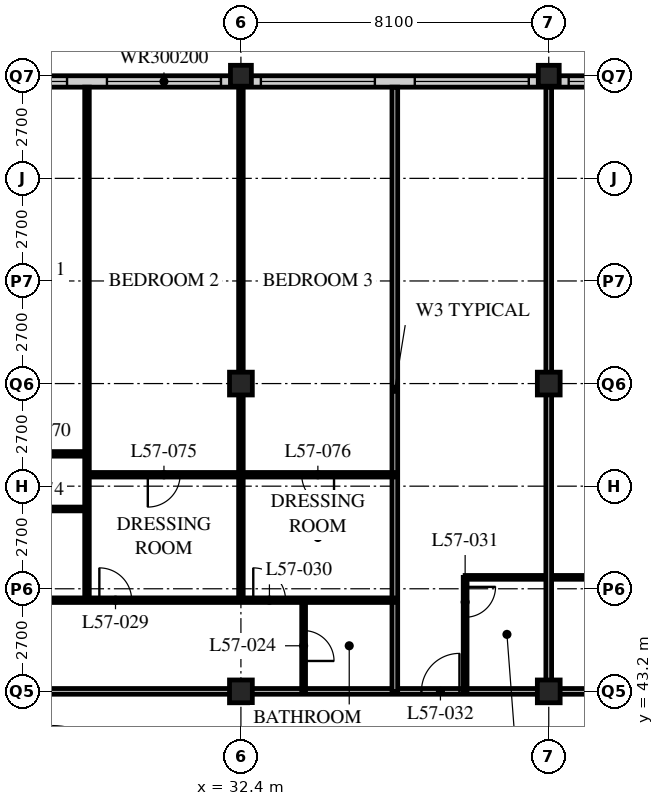
"""IFC4 building model, lengths in metres.
Left out: names, types, materials, properties, quantities, classifications, styles, units other than length and angle.
Written with IfcOpenShell. Run it as: python <this file> out.ifc"""

import sys

from ifc_helpers import new_model, si_unit, direction, frame, frame_2d, origin, origin_2d, place, context, subcontext, project, spatial, rectangle, hollow_rectangle, extrude, element, fill, save


model = new_model("IFC4")
c1 = context("Model", 3, precision=1e-05, world=origin(), true_north=direction((0.0, 1.0)))
c2 = subcontext(c1, "Body", "Model", "MODEL_VIEW")
j1 = project(units=[si_unit("LENGTHUNIT", "METRE"), si_unit("PLANEANGLEUNIT", "RADIAN")], contexts=[c1])
p1 = place(None, origin())
s1 = spatial("IfcSite", under=j1, at=p1, CompositionType="ELEMENT")
p2 = place(p1, origin())
s2 = spatial("IfcBuilding", under=s1, at=p2, CompositionType="ELEMENT")
p3 = place(p2, frame((0.0, 0.0, 220.8)))
s3 = spatial("IfcBuildingStorey", under=s2, at=p3, CompositionType="ELEMENT", Elevation=220.8)
for number, where, z_axis, x_axis in (
    (1, (32.4, 43.2, 0.0), (0.0, 0.0, 1.0), (1.0, 0.0, 0.0)),
    (2, (32.4, 51.3, 0.0), (0.0, 0.0, 1.0), (1.0, 0.0, 0.0)),
):
    element("IfcColumn", number, at=place(p3, frame(where, z_axis=z_axis, x_axis=x_axis)), inside=s3, PredefinedType="COLUMN", context=c2, shape_type="SweptSolid", body=[
        extrude(hollow_rectangle(XDim=0.6, YDim=0.6, WallThickness=0.05, at=origin_2d()), origin(), (0.0, 0.0, 1.0), 3.6),
    ])
p4 = place(p3, frame((32.4, 59.4, 0.0), z_axis=(0.0, 0.0, 1.0), x_axis=(1.0, 0.0, 0.0)))
e3 = element("IfcColumn", 3, at=p4, inside=s3, PredefinedType="COLUMN", context=c2, shape_type="SweptSolid", body=[
    extrude(hollow_rectangle(XDim=0.55, YDim=0.55, WallThickness=0.045, at=origin_2d()), origin(), (0.0, 0.0, 1.0), 3.6),
])
for number, where, z_axis, x_axis in (
    (4, (40.5, 43.2, 0.0), (0.0, 0.0, 1.0), (1.0, 0.0, 0.0)),
    (5, (40.5, 51.3, 0.0), (0.0, 0.0, 1.0), (1.0, 0.0, 0.0)),
):
    element("IfcColumn", number, at=place(p3, frame(where, z_axis=z_axis, x_axis=x_axis)), inside=s3, PredefinedType="COLUMN", context=c2, shape_type="SweptSolid", body=[
        extrude(hollow_rectangle(XDim=0.6, YDim=0.6, WallThickness=0.05, at=origin_2d()), origin(), (0.0, 0.0, 1.0), 3.6),
    ])
p5 = place(p3, frame((40.5, 59.4, 0.0), z_axis=(0.0, 0.0, 1.0), x_axis=(1.0, 0.0, 0.0)))
e6 = element("IfcColumn", 6, at=p5, inside=s3, PredefinedType="COLUMN", context=c2, shape_type="SweptSolid", body=[
    extrude(hollow_rectangle(XDim=0.55, YDim=0.55, WallThickness=0.045, at=origin_2d()), origin(), (0.0, 0.0, 1.0), 3.6),
])
p6 = place(p3, frame((48.3, 59.25, 0.0), z_axis=(0.0, 0.0, 1.0), x_axis=(-1.0, 0.0, 0.0)))
e7 = element("IfcWall", 7, at=p6, inside=s3, PredefinedType="SOLIDWALL", context=c2, shape_type="SweptSolid", body=[
    extrude(rectangle(XDim=40.2, YDim=0.3, at=frame_2d((20.1, 0.0))), origin(), (0.0, 0.0, 1.0), 3.39),
])
p7 = place(p6, frame((0.225, 0.0, 0.6)))
e8 = element("IfcOpeningElement", 8, at=p7, cuts=e7, PredefinedType="OPENING", context=c2, shape_type="SweptSolid", body=[
    extrude(rectangle(XDim=3.0, YDim=2.0, at=frame_2d((1.5, 1.0))), frame((0.0, 0.16, 0.0), z_axis=(0.0, -1.0, 0.0), x_axis=(1.0, 0.0, 0.0)), (0.0, 0.0, 1.0), 0.32),
])
p8 = place(p6, frame((4.275, 0.0, 0.6)))
e9 = element("IfcOpeningElement", 9, at=p8, cuts=e7, PredefinedType="OPENING", context=c2, shape_type="SweptSolid", body=[
    extrude(rectangle(XDim=3.0, YDim=2.0, at=frame_2d((1.5, 1.0))), frame((0.0, 0.16, 0.0), z_axis=(0.0, -1.0, 0.0), x_axis=(1.0, 0.0, 0.0)), (0.0, 0.0, 1.0), 0.32),
])
p9 = place(p6, frame((8.325, 0.0, 0.6)))
e10 = element("IfcOpeningElement", 10, at=p9, cuts=e7, PredefinedType="OPENING", context=c2, shape_type="SweptSolid", body=[
    extrude(rectangle(XDim=3.0, YDim=2.0, at=frame_2d((1.5, 1.0))), frame((0.0, 0.16, 0.0), z_axis=(0.0, -1.0, 0.0), x_axis=(1.0, 0.0, 0.0)), (0.0, 0.0, 1.0), 0.32),
])
p10 = place(p6, frame((12.375, 0.0, 0.6)))
e11 = element("IfcOpeningElement", 11, at=p10, cuts=e7, PredefinedType="OPENING", context=c2, shape_type="SweptSolid", body=[
    extrude(rectangle(XDim=3.0, YDim=2.0, at=frame_2d((1.5, 1.0))), frame((0.0, 0.16, 0.0), z_axis=(0.0, -1.0, 0.0), x_axis=(1.0, 0.0, 0.0)), (0.0, 0.0, 1.0), 0.32),
])
p11 = place(p6, frame((16.425, 0.0, 0.6)))
e12 = element("IfcOpeningElement", 12, at=p11, cuts=e7, PredefinedType="OPENING", context=c2, shape_type="SweptSolid", body=[
    extrude(rectangle(XDim=3.0, YDim=2.0, at=frame_2d((1.5, 1.0))), frame((0.0, 0.16, 0.0), z_axis=(0.0, -1.0, 0.0), x_axis=(1.0, 0.0, 0.0)), (0.0, 0.0, 1.0), 0.32),
])
p12 = place(p6, frame((20.475, 0.0, 0.6)))
e13 = element("IfcOpeningElement", 13, at=p12, cuts=e7, PredefinedType="OPENING", context=c2, shape_type="SweptSolid", body=[
    extrude(rectangle(XDim=3.0, YDim=2.0, at=frame_2d((1.5, 1.0))), frame((0.0, 0.16, 0.0), z_axis=(0.0, -1.0, 0.0), x_axis=(1.0, 0.0, 0.0)), (0.0, 0.0, 1.0), 0.32),
])
p13 = place(p6, frame((24.525, 0.0, 0.6)))
e14 = element("IfcOpeningElement", 14, at=p13, cuts=e7, PredefinedType="OPENING", context=c2, shape_type="SweptSolid", body=[
    extrude(rectangle(XDim=3.0, YDim=2.0, at=frame_2d((1.5, 1.0))), frame((0.0, 0.16, 0.0), z_axis=(0.0, -1.0, 0.0), x_axis=(1.0, 0.0, 0.0)), (0.0, 0.0, 1.0), 0.32),
])
p14 = place(p6, frame((28.575, 0.0, 0.6)))
e15 = element("IfcOpeningElement", 15, at=p14, cuts=e7, PredefinedType="OPENING", context=c2, shape_type="SweptSolid", body=[
    extrude(rectangle(XDim=3.0, YDim=2.0, at=frame_2d((1.5, 1.0))), frame((0.0, 0.16, 0.0), z_axis=(0.0, -1.0, 0.0), x_axis=(1.0, 0.0, 0.0)), (0.0, 0.0, 1.0), 0.32),
])
p15 = place(p6, frame((32.625, 0.0, 0.6)))
e16 = element("IfcOpeningElement", 16, at=p15, cuts=e7, PredefinedType="OPENING", context=c2, shape_type="SweptSolid", body=[
    extrude(rectangle(XDim=3.0, YDim=2.0, at=frame_2d((1.5, 1.0))), frame((0.0, 0.16, 0.0), z_axis=(0.0, -1.0, 0.0), x_axis=(1.0, 0.0, 0.0)), (0.0, 0.0, 1.0), 0.32),
])
p16 = place(p6, frame((36.675, 0.0, 0.6)))
e17 = element("IfcOpeningElement", 17, at=p16, cuts=e7, PredefinedType="OPENING", context=c2, shape_type="SweptSolid", body=[
    extrude(rectangle(XDim=3.0, YDim=2.0, at=frame_2d((1.5, 1.0))), frame((0.0, 0.16, 0.0), z_axis=(0.0, -1.0, 0.0), x_axis=(1.0, 0.0, 0.0)), (0.0, 0.0, 1.0), 0.32),
])
p17 = place(p3, frame((12.15, 43.2, 0.0), z_axis=(0.0, 0.0, 1.0), x_axis=(1.0, 0.0, 0.0)))
e18 = element("IfcWall", 18, at=p17, inside=s3, PredefinedType="PARTITIONING", context=c2, shape_type="SweptSolid", body=[
    extrude(rectangle(XDim=36.45, YDim=0.15, at=frame_2d((18.225, 0.0))), origin(), (0.0, 0.0, 1.0), 2.628),
])
p18 = place(p17, frame((4.95, 0.0, 0.0)))
e19 = element("IfcOpeningElement", 19, at=p18, cuts=e18, PredefinedType="OPENING", context=c2, shape_type="SweptSolid", body=[
    extrude(rectangle(XDim=1.0, YDim=2.1, at=frame_2d((0.5, 1.05))), frame((0.0, 0.085, 0.0), z_axis=(0.0, -1.0, 0.0), x_axis=(1.0, 0.0, 0.0)), (0.0, 0.0, 1.0), 0.17),
])
p19 = place(p17, frame((25.0, 0.0, 0.0)))
e20 = element("IfcOpeningElement", 20, at=p19, cuts=e18, PredefinedType="OPENING", context=c2, shape_type="SweptSolid", body=[
    extrude(rectangle(XDim=1.0, YDim=2.1, at=frame_2d((0.5, 1.05))), frame((0.0, 0.085, 0.0), z_axis=(0.0, -1.0, 0.0), x_axis=(1.0, 0.0, 0.0)), (0.0, 0.0, 1.0), 0.17),
])
p20 = place(p17, frame((30.7, 0.0, 0.0)))
e21 = element("IfcOpeningElement", 21, at=p20, cuts=e18, PredefinedType="OPENING", context=c2, shape_type="SweptSolid", body=[
    extrude(rectangle(XDim=1.0, YDim=2.1, at=frame_2d((0.5, 1.05))), frame((0.0, 0.085, 0.0), z_axis=(0.0, -1.0, 0.0), x_axis=(1.0, 0.0, 0.0)), (0.0, 0.0, 1.0), 0.17),
])
p21 = place(p17, frame((33.925, 0.0, 0.0)))
e22 = element("IfcOpeningElement", 22, at=p21, cuts=e18, PredefinedType="OPENING", context=c2, shape_type="SweptSolid", body=[
    extrude(rectangle(XDim=1.0, YDim=2.1, at=frame_2d((0.5, 1.05))), frame((0.0, 0.085, 0.0), z_axis=(0.0, -1.0, 0.0), x_axis=(1.0, 0.0, 0.0)), (0.0, 0.0, 1.0), 0.17),
])
p22 = place(p17, frame((1.525, 0.0, 0.0)))
e23 = element("IfcOpeningElement", 23, at=p22, cuts=e18, PredefinedType="OPENING", context=c2, shape_type="SweptSolid", body=[
    extrude(rectangle(XDim=1.0, YDim=2.1, at=frame_2d((0.5, 1.05))), frame((0.0, 0.085, 0.0), z_axis=(0.0, -1.0, 0.0), x_axis=(1.0, 0.0, 0.0)), (0.0, 0.0, 1.0), 0.17),
])
p23 = place(p3, frame((34.05, 43.2, 0.0), z_axis=(0.0, 0.0, 1.0), x_axis=(0.0, 1.0, 0.0)))
e24 = element("IfcWall", 24, at=p23, inside=s3, PredefinedType="PARTITIONING", context=c2, shape_type="SweptSolid", body=[
    extrude(rectangle(XDim=2.4, YDim=0.1, at=frame_2d((1.2, 0.0))), origin(), (0.0, 0.0, 1.0), 3.39),
])
p24 = place(p23, frame((0.8, 0.0, 0.0)))
e25 = element("IfcOpeningElement", 25, at=p24, cuts=e24, PredefinedType="OPENING", context=c2, shape_type="SweptSolid", body=[
    extrude(rectangle(XDim=0.8, YDim=2.1, at=frame_2d((0.4, 1.05))), frame((0.0, 0.06, 0.0), z_axis=(0.0, -1.0, 0.0), x_axis=(1.0, 0.0, 0.0)), (0.0, 0.0, 1.0), 0.12),
])
p25 = place(p3, frame((26.05, 48.0, 0.0), z_axis=(0.0, 0.0, 1.0), x_axis=(1.0, 0.0, 0.0)))
e26 = element("IfcWall", 26, at=p25, inside=s3, PredefinedType="PARTITIONING", context=c2, shape_type="SweptSolid", body=[
    extrude(rectangle(XDim=2.3, YDim=0.1, at=frame_2d((1.15, 0.0))), origin(), (0.0, 0.0, 1.0), 3.39),
])
p26 = place(p3, frame((28.35, 45.6, 0.0), z_axis=(0.0, 0.0, 1.0), x_axis=(0.0, 1.0, 0.0)))
e27 = element("IfcWall", 27, at=p26, inside=s3, PredefinedType="PARTITIONING", context=c2, shape_type="SweptSolid", body=[
    extrude(rectangle(XDim=13.5, YDim=0.12, at=frame_2d((6.75, 0.0))), origin(), (0.0, 0.0, 1.0), 3.39),
])
p27 = place(p3, frame((32.4, 45.6, 0.0), z_axis=(0.0, 0.0, 1.0), x_axis=(0.0, 1.0, 0.0)))
e28 = element("IfcWall", 28, at=p27, inside=s3, PredefinedType="PARTITIONING", context=c2, shape_type="SweptSolid", body=[
    extrude(rectangle(XDim=13.5, YDim=0.12, at=frame_2d((6.75, 0.0))), origin(), (0.0, 0.0, 1.0), 2.628),
])
p28 = place(p3, frame((36.45, 43.2, 0.0), z_axis=(0.0, 0.0, 1.0), x_axis=(0.0, 1.0, 0.0)))
e29 = element("IfcWall", 29, at=p28, inside=s3, PredefinedType="PARTITIONING", context=c2, shape_type="SweptSolid", body=[
    extrude(rectangle(XDim=15.9, YDim=0.15, at=frame_2d((7.95, 0.0))), origin(), (0.0, 0.0, 1.0), 3.39),
])
p29 = place(p3, frame((38.3, 46.2, 0.0), z_axis=(0.0, 0.0, 1.0), x_axis=(1.0, 0.0, 0.0)))
e30 = element("IfcWall", 30, at=p29, inside=s3, PredefinedType="PARTITIONING", context=c2, shape_type="SweptSolid", body=[
    extrude(rectangle(XDim=4.4, YDim=0.1, at=frame_2d((2.2, 0.0))), origin(), (0.0, 0.0, 1.0), 3.39),
])
p30 = place(p3, frame((38.3, 43.2, 0.0), z_axis=(0.0, 0.0, 1.0), x_axis=(0.0, 1.0, 0.0)))
e31 = element("IfcWall", 31, at=p30, inside=s3, PredefinedType="PARTITIONING", context=c2, shape_type="SweptSolid", body=[
    extrude(rectangle(XDim=3.0, YDim=0.1, at=frame_2d((1.5, 0.0))), origin(), (0.0, 0.0, 1.0), 3.39),
])
p31 = place(p30, frame((1.95, 0.0, 0.0)))
e32 = element("IfcOpeningElement", 32, at=p31, cuts=e31, PredefinedType="OPENING", context=c2, shape_type="SweptSolid", body=[
    extrude(rectangle(XDim=0.8, YDim=2.1, at=frame_2d((0.4, 1.05))), frame((0.0, 0.06, 0.0), z_axis=(0.0, -1.0, 0.0), x_axis=(1.0, 0.0, 0.0)), (0.0, 0.0, 1.0), 0.12),
])
p32 = place(p3, frame((40.5, 43.2, 0.0), z_axis=(0.0, 0.0, 1.0), x_axis=(0.0, 1.0, 0.0)))
e33 = element("IfcWall", 33, at=p32, inside=s3, PredefinedType="PARTITIONING", context=c2, shape_type="SweptSolid", body=[
    extrude(rectangle(XDim=15.9, YDim=0.15, at=frame_2d((7.95, 0.0))), origin(), (0.0, 0.0, 1.0), 2.628),
])
p33 = place(p3, frame((8.15, 45.6, 0.0), z_axis=(0.0, 0.0, 1.0), x_axis=(1.0, 0.0, 0.0)))
e34 = element("IfcWall", 34, at=p33, inside=s3, PredefinedType="PARTITIONING", context=c2, shape_type="SweptSolid", body=[
    extrude(rectangle(XDim=28.3, YDim=0.12, at=frame_2d((14.15, 0.0))), origin(), (0.0, 0.0, 1.0), 3.39),
])
p34 = place(p33, frame((9.025, 0.0, 0.0)))
e35 = element("IfcOpeningElement", 35, at=p34, cuts=e34, PredefinedType="OPENING", context=c2, shape_type="SweptSolid", body=[
    extrude(rectangle(XDim=0.85, YDim=2.1, at=frame_2d((0.425, 1.05))), frame((0.0, 0.07, 0.0), z_axis=(0.0, -1.0, 0.0), x_axis=(1.0, 0.0, 0.0)), (0.0, 0.0, 1.0), 0.14),
])
p35 = place(p33, frame((16.475, 0.0, 0.0)))
e36 = element("IfcOpeningElement", 36, at=p35, cuts=e34, PredefinedType="OPENING", context=c2, shape_type="SweptSolid", body=[
    extrude(rectangle(XDim=0.85, YDim=2.1, at=frame_2d((0.425, 1.05))), frame((0.0, 0.07, 0.0), z_axis=(0.0, -1.0, 0.0), x_axis=(1.0, 0.0, 0.0)), (0.0, 0.0, 1.0), 0.14),
])
p36 = place(p33, frame((20.525, 0.0, 0.0)))
e37 = element("IfcOpeningElement", 37, at=p36, cuts=e34, PredefinedType="OPENING", context=c2, shape_type="SweptSolid", body=[
    extrude(rectangle(XDim=0.85, YDim=2.1, at=frame_2d((0.425, 1.05))), frame((0.0, 0.07, 0.0), z_axis=(0.0, -1.0, 0.0), x_axis=(1.0, 0.0, 0.0)), (0.0, 0.0, 1.0), 0.14),
])
p37 = place(p33, frame((24.575, 0.0, 0.0)))
e38 = element("IfcOpeningElement", 38, at=p37, cuts=e34, PredefinedType="OPENING", context=c2, shape_type="SweptSolid", body=[
    extrude(rectangle(XDim=0.85, YDim=2.1, at=frame_2d((0.425, 1.05))), frame((0.0, 0.07, 0.0), z_axis=(0.0, -1.0, 0.0), x_axis=(1.0, 0.0, 0.0)), (0.0, 0.0, 1.0), 0.14),
])
p38 = place(p33, frame((6.725, 0.0, 0.0)))
e39 = element("IfcOpeningElement", 39, at=p38, cuts=e34, PredefinedType="OPENING", context=c2, shape_type="SweptSolid", body=[
    extrude(rectangle(XDim=0.85, YDim=2.1, at=frame_2d((0.425, 1.05))), frame((0.0, 0.07, 0.0), z_axis=(0.0, -1.0, 0.0), x_axis=(1.0, 0.0, 0.0)), (0.0, 0.0, 1.0), 0.14),
])
p39 = place(p33, frame((2.875, 0.0, 0.0)))
e40 = element("IfcOpeningElement", 40, at=p39, cuts=e34, PredefinedType="OPENING", context=c2, shape_type="SweptSolid", body=[
    extrude(rectangle(XDim=0.85, YDim=2.1, at=frame_2d((0.425, 1.05))), frame((0.0, 0.07, 0.0), z_axis=(0.0, -1.0, 0.0), x_axis=(1.0, 0.0, 0.0)), (0.0, 0.0, 1.0), 0.14),
])
p40 = place(p3, frame((24.3, 49.45, 0.0), z_axis=(0.0, 0.0, 1.0), x_axis=(1.0, 0.0, 0.0)))
e41 = element("IfcWall", 41, at=p40, inside=s3, PredefinedType="PARTITIONING", context=c2, shape_type="SweptSolid", body=[
    extrude(rectangle(XDim=4.05, YDim=0.12, at=frame_2d((2.025, 0.0))), origin(), (0.0, 0.0, 1.0), 3.39),
])
p41 = place(p40, frame((1.6, 0.0, 0.0)))
e42 = element("IfcOpeningElement", 42, at=p41, cuts=e41, PredefinedType="OPENING", context=c2, shape_type="SweptSolid", body=[
    extrude(rectangle(XDim=0.85, YDim=2.1, at=frame_2d((0.425, 1.05))), frame((0.0, 0.07, 0.0), z_axis=(0.0, -1.0, 0.0), x_axis=(1.0, 0.0, 0.0)), (0.0, 0.0, 1.0), 0.14),
])
p42 = place(p3, frame((28.35, 48.9, 0.0), z_axis=(0.0, 0.0, 1.0), x_axis=(1.0, 0.0, 0.0)))
e43 = element("IfcWall", 43, at=p42, inside=s3, PredefinedType="PARTITIONING", context=c2, shape_type="SweptSolid", body=[
    extrude(rectangle(XDim=8.1, YDim=0.12, at=frame_2d((4.05, 0.0))), origin(), (0.0, 0.0, 1.0), 3.39),
])
p43 = place(p42, frame((1.6, 0.0, 0.0)))
e44 = element("IfcOpeningElement", 44, at=p43, cuts=e43, PredefinedType="OPENING", context=c2, shape_type="SweptSolid", body=[
    extrude(rectangle(XDim=0.85, YDim=2.1, at=frame_2d((0.425, 1.05))), frame((0.0, 0.07, 0.0), z_axis=(0.0, -1.0, 0.0), x_axis=(1.0, 0.0, 0.0)), (0.0, 0.0, 1.0), 0.14),
])
p44 = place(p42, frame((5.65, 0.0, 0.0)))
e45 = element("IfcOpeningElement", 45, at=p44, cuts=e43, PredefinedType="OPENING", context=c2, shape_type="SweptSolid", body=[
    extrude(rectangle(XDim=0.85, YDim=2.1, at=frame_2d((0.425, 1.05))), frame((0.0, 0.07, 0.0), z_axis=(0.0, -1.0, 0.0), x_axis=(1.0, 0.0, 0.0)), (0.0, 0.0, 1.0), 0.14),
])
p45 = place(p8, origin())
e46 = element("IfcWindow", 46, at=p45, inside=s3, PartitioningType="SINGLE_PANEL", PredefinedType="WINDOW", context=c2, shape_type="SweptSolid", body=[
    extrude(rectangle(XDim=3.0, YDim=2.0, at=frame_2d((1.5, 1.0))), frame((0.0, 0.03, 0.0), z_axis=(0.0, -1.0, 0.0), x_axis=(1.0, 0.0, 0.0)), (0.0, 0.0, 1.0), 0.06),
])
fill(e9, e46)
p46 = place(p9, origin())
e47 = element("IfcWindow", 47, at=p46, inside=s3, PartitioningType="SINGLE_PANEL", PredefinedType="WINDOW", context=c2, shape_type="SweptSolid", body=[
    extrude(rectangle(XDim=3.0, YDim=2.0, at=frame_2d((1.5, 1.0))), frame((0.0, 0.03, 0.0), z_axis=(0.0, -1.0, 0.0), x_axis=(1.0, 0.0, 0.0)), (0.0, 0.0, 1.0), 0.06),
])
fill(e10, e47)
p47 = place(p10, origin())
e48 = element("IfcWindow", 48, at=p47, inside=s3, PartitioningType="SINGLE_PANEL", PredefinedType="WINDOW", context=c2, shape_type="SweptSolid", body=[
    extrude(rectangle(XDim=3.0, YDim=2.0, at=frame_2d((1.5, 1.0))), frame((0.0, 0.03, 0.0), z_axis=(0.0, -1.0, 0.0), x_axis=(1.0, 0.0, 0.0)), (0.0, 0.0, 1.0), 0.06),
])
fill(e11, e48)
p48 = place(p11, origin())
e49 = element("IfcWindow", 49, at=p48, inside=s3, PartitioningType="SINGLE_PANEL", PredefinedType="WINDOW", context=c2, shape_type="SweptSolid", body=[
    extrude(rectangle(XDim=3.0, YDim=2.0, at=frame_2d((1.5, 1.0))), frame((0.0, 0.03, 0.0), z_axis=(0.0, -1.0, 0.0), x_axis=(1.0, 0.0, 0.0)), (0.0, 0.0, 1.0), 0.06),
])
fill(e12, e49)
p49 = place(p12, origin())
e50 = element("IfcWindow", 50, at=p49, inside=s3, PartitioningType="SINGLE_PANEL", PredefinedType="WINDOW", context=c2, shape_type="SweptSolid", body=[
    extrude(rectangle(XDim=3.0, YDim=2.0, at=frame_2d((1.5, 1.0))), frame((0.0, 0.03, 0.0), z_axis=(0.0, -1.0, 0.0), x_axis=(1.0, 0.0, 0.0)), (0.0, 0.0, 1.0), 0.06),
])
fill(e13, e50)
p50 = place(p24, origin())
e51 = element("IfcDoor", 51, at=p50, inside=s3, OperationType="SINGLE_SWING_RIGHT", PredefinedType="DOOR", context=c2, shape_type="SweptSolid", body=[
    extrude(rectangle(XDim=0.8, YDim=2.1, at=frame_2d((0.4, 1.05))), frame((0.0, 0.025, 0.0), z_axis=(0.0, -1.0, 0.0), x_axis=(1.0, 0.0, 0.0)), (0.0, 0.0, 1.0), 0.05),
])
fill(e25, e51)
p51 = place(p36, origin())
e52 = element("IfcDoor", 52, at=p51, inside=s3, OperationType="SINGLE_SWING_LEFT", PredefinedType="DOOR", context=c2, shape_type="SweptSolid", body=[
    extrude(rectangle(XDim=0.85, YDim=2.1, at=frame_2d((0.425, 1.05))), frame((0.0, 0.025, 0.0), z_axis=(0.0, -1.0, 0.0), x_axis=(1.0, 0.0, 0.0)), (0.0, 0.0, 1.0), 0.05),
])
fill(e37, e52)
p52 = place(p37, origin())
e53 = element("IfcDoor", 53, at=p52, inside=s3, OperationType="SINGLE_SWING_LEFT", PredefinedType="DOOR", context=c2, shape_type="SweptSolid", body=[
    extrude(rectangle(XDim=0.85, YDim=2.1, at=frame_2d((0.425, 1.05))), frame((0.0, 0.025, 0.0), z_axis=(0.0, -1.0, 0.0), x_axis=(1.0, 0.0, 0.0)), (0.0, 0.0, 1.0), 0.05),
])
fill(e38, e53)
p53 = place(p31, origin())
e54 = element("IfcDoor", 54, at=p53, inside=s3, OperationType="SINGLE_SWING_LEFT", PredefinedType="DOOR", context=c2, shape_type="SweptSolid", body=[
    extrude(rectangle(XDim=0.8, YDim=2.1, at=frame_2d((0.4, 1.05))), frame((0.0, 0.025, 0.0), z_axis=(0.0, -1.0, 0.0), x_axis=(1.0, 0.0, 0.0)), (0.0, 0.0, 1.0), 0.05),
])
fill(e32, e54)
p54 = place(p19, origin())
e55 = element("IfcDoor", 55, at=p54, inside=s3, OperationType="SINGLE_SWING_RIGHT", PredefinedType="DOOR", context=c2, shape_type="SweptSolid", body=[
    extrude(rectangle(XDim=1.0, YDim=2.1, at=frame_2d((0.5, 1.05))), frame((0.0, 0.025, 0.0), z_axis=(0.0, -1.0, 0.0), x_axis=(1.0, 0.0, 0.0)), (0.0, 0.0, 1.0), 0.05),
])
fill(e20, e55)
p55 = place(p43, origin())
e56 = element("IfcDoor", 56, at=p55, inside=s3, OperationType="SINGLE_SWING_RIGHT", PredefinedType="DOOR", context=c2, shape_type="SweptSolid", body=[
    extrude(rectangle(XDim=0.85, YDim=2.1, at=frame_2d((0.425, 1.05))), frame((0.0, 0.025, 0.0), z_axis=(0.0, -1.0, 0.0), x_axis=(1.0, 0.0, 0.0)), (0.0, 0.0, 1.0), 0.05),
])
fill(e44, e56)
p56 = place(p44, origin())
e57 = element("IfcDoor", 57, at=p56, inside=s3, OperationType="SINGLE_SWING_LEFT", PredefinedType="DOOR", context=c2, shape_type="SweptSolid", body=[
    extrude(rectangle(XDim=0.85, YDim=2.1, at=frame_2d((0.425, 1.05))), frame((0.0, 0.025, 0.0), z_axis=(0.0, -1.0, 0.0), x_axis=(1.0, 0.0, 0.0)), (0.0, 0.0, 1.0), 0.05),
])
fill(e45, e57)
save(model, sys.argv[1])
